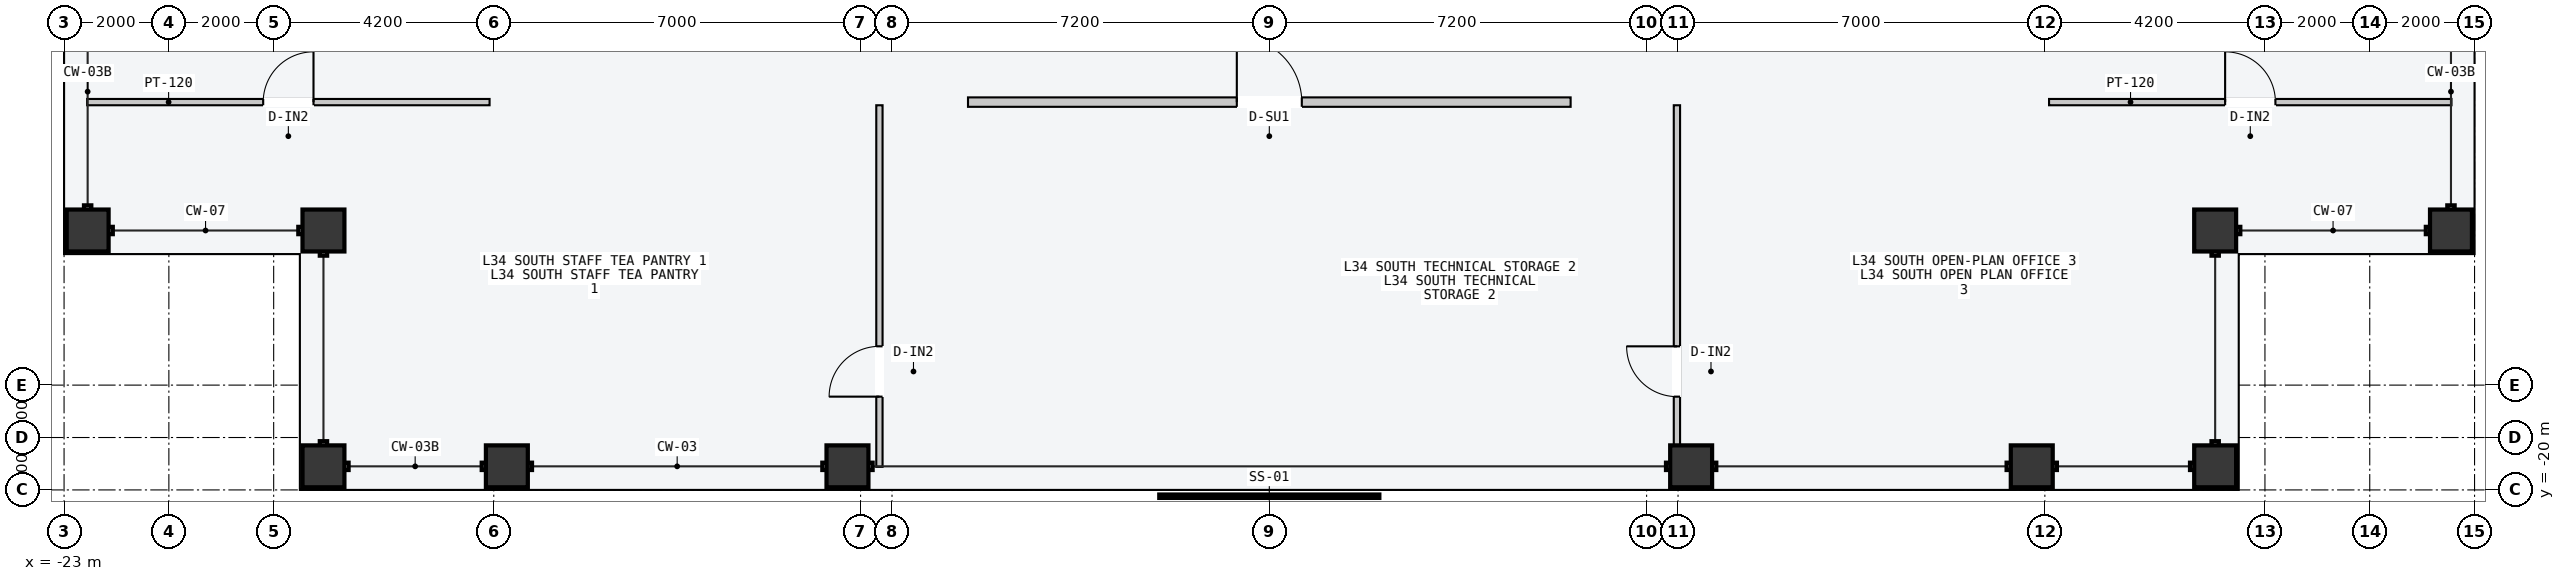
"""IFC4 building model, lengths in metres.
Left out: names, types, materials, properties, quantities, classifications, styles, units other than length and angle.
Written with IfcOpenShell. Run it as: python <this file> out.ifc"""

import sys

from ifc_helpers import new_model, si_unit, direction, frame, frame_2d, origin, origin_2d, place, context, subcontext, project, spatial, rectangle, hollow_rectangle, extrude, element, fill, save


model = new_model("IFC4")
c1 = context("Model", 3, precision=1e-05, world=origin(), true_north=direction((0.0, 1.0)))
c2 = subcontext(c1, "Body", "Model", "MODEL_VIEW")
j1 = project(units=[si_unit("LENGTHUNIT", "METRE"), si_unit("PLANEANGLEUNIT", "RADIAN")], contexts=[c1])
p1 = place(None, origin())
s1 = spatial("IfcSite", under=j1, at=p1, CompositionType="ELEMENT")
p2 = place(p1, origin())
s2 = spatial("IfcBuilding", under=s1, at=p2, CompositionType="ELEMENT")
p3 = place(p2, frame((0.0, 0.0, 131.4)))
s3 = spatial("IfcBuildingStorey", under=s2, at=p3, CompositionType="ELEMENT", Elevation=131.4)
for number, where, z_axis, x_axis in (
    (1, (-18.05, -19.55, 0.0), (0.0, 0.0, 1.0), (1.0, 0.0, 0.0)),
    (2, (-14.55, -19.55, 0.0), (0.0, 0.0, 1.0), (1.0, 0.0, 0.0)),
    (3, (-8.05, -19.55, 0.0), (0.0, 0.0, 1.0), (1.0, 0.0, 0.0)),
    (4, (8.05, -19.55, 0.0), (0.0, 0.0, 1.0), (1.0, 0.0, 0.0)),
    (5, (14.55, -19.55, 0.0), (0.0, 0.0, 1.0), (1.0, 0.0, 0.0)),
    (6, (18.05, -19.55, 0.0), (0.0, 0.0, 1.0), (1.0, 0.0, 0.0)),
    (7, (-22.55, -15.05, 0.0), (0.0, 0.0, 1.0), (0.0, 1.0, 0.0)),
    (8, (22.55, -15.05, 0.0), (0.0, 0.0, 1.0), (0.0, 1.0, 0.0)),
    (9, (18.05, -15.05, 0.0), (0.0, 0.0, 1.0), (1.0, 0.0, 0.0)),
    (10, (-18.05, -15.05, 0.0), (0.0, 0.0, 1.0), (1.0, 0.0, 0.0)),
):
    element("IfcColumn", number, at=place(p3, frame(where, z_axis=z_axis, x_axis=x_axis)), inside=s3, PredefinedType="COLUMN", context=c2, shape_type="SweptSolid", body=[
        extrude(hollow_rectangle(XDim=0.8, YDim=0.8, WallThickness=0.036, at=origin_2d()), origin(), (0.0, 0.0, 1.0), 3.6),
    ])
p4 = place(p3, frame((-7.44, -19.56, 0.0), z_axis=(0.0, 0.0, 1.0), x_axis=(0.0, 1.0, 0.0)))
e11 = element("IfcWall", 11, at=p4, inside=s3, PredefinedType="PARTITIONING", context=c2, shape_type="SweptSolid", body=[
    extrude(rectangle(XDim=6.9, YDim=0.12, at=frame_2d((3.45, 0.0))), origin(), (0.0, 0.0, 1.0), 3.4),
])
p5 = place(p4, frame((1.34, 0.0, 0.0)))
e12 = element("IfcOpeningElement", 12, at=p5, cuts=e11, PredefinedType="OPENING", context=c2, shape_type="SweptSolid", body=[
    extrude(rectangle(XDim=0.96, YDim=2.18, at=frame_2d((0.48, 1.09))), frame((0.0, 0.07, 0.0), z_axis=(0.0, -1.0, 0.0), x_axis=(1.0, 0.0, 0.0)), (0.0, 0.0, 1.0), 0.14),
])
p6 = place(p3, frame((7.779, -19.56, 0.0), z_axis=(0.0, 0.0, 1.0), x_axis=(0.0, 1.0, 0.0)))
e13 = element("IfcWall", 13, at=p6, inside=s3, PredefinedType="PARTITIONING", context=c2, shape_type="SweptSolid", body=[
    extrude(rectangle(XDim=6.9, YDim=0.12, at=frame_2d((3.45, 0.0))), origin(), (0.0, 0.0, 1.0), 3.4),
])
p7 = place(p6, frame((1.34, 0.0, 0.0)))
e14 = element("IfcOpeningElement", 14, at=p7, cuts=e13, PredefinedType="OPENING", context=c2, shape_type="SweptSolid", body=[
    extrude(rectangle(XDim=0.96, YDim=2.18, at=frame_2d((0.48, 1.09))), frame((0.0, 0.07, 0.0), z_axis=(0.0, -1.0, 0.0), x_axis=(1.0, 0.0, 0.0)), (0.0, 0.0, 1.0), 0.14),
])
p8 = place(p3, frame((-5.75, -12.6, 0.0), z_axis=(0.0, 0.0, 1.0), x_axis=(1.0, 0.0, 0.0)))
e15 = element("IfcWall", 15, at=p8, inside=s3, PredefinedType="PARTITIONING", context=c2, shape_type="SweptSolid", body=[
    extrude(rectangle(XDim=11.5, YDim=0.18, at=frame_2d((5.75, 0.0))), origin(), (0.0, 0.0, 1.0), 3.4),
])
p9 = place(p8, frame((5.13, 0.0, 0.0)))
e16 = element("IfcOpeningElement", 16, at=p9, cuts=e15, PredefinedType="OPENING", context=c2, shape_type="SweptSolid", body=[
    extrude(rectangle(XDim=1.24, YDim=2.24, at=frame_2d((0.62, 1.12))), frame((0.0, 0.1, 0.0), z_axis=(0.0, -1.0, 0.0), x_axis=(1.0, 0.0, 0.0)), (0.0, 0.0, 1.0), 0.2),
])
p10 = place(p3, frame((-22.56, -12.6, 0.0), z_axis=(0.0, 0.0, 1.0), x_axis=(1.0, 0.0, 0.0)))
e17 = element("IfcWall", 17, at=p10, inside=s3, PredefinedType="PARTITIONING", context=c2, shape_type="SweptSolid", body=[
    extrude(rectangle(XDim=7.68, YDim=0.12, at=frame_2d((3.84, 0.0))), origin(), (0.0, 0.0, 1.0), 3.4),
])
p11 = place(p10, frame((3.36, 0.0, 0.0)))
e18 = element("IfcOpeningElement", 18, at=p11, cuts=e17, PredefinedType="OPENING", context=c2, shape_type="SweptSolid", body=[
    extrude(rectangle(XDim=0.96, YDim=2.18, at=frame_2d((0.48, 1.09))), frame((0.0, 0.07, 0.0), z_axis=(0.0, -1.0, 0.0), x_axis=(1.0, 0.0, 0.0)), (0.0, 0.0, 1.0), 0.14),
])
p12 = place(p3, frame((14.88, -12.6, 0.0), z_axis=(0.0, 0.0, 1.0), x_axis=(1.0, 0.0, 0.0)))
e19 = element("IfcWall", 19, at=p12, inside=s3, PredefinedType="PARTITIONING", context=c2, shape_type="SweptSolid", body=[
    extrude(rectangle(XDim=7.68, YDim=0.12, at=frame_2d((3.84, 0.0))), origin(), (0.0, 0.0, 1.0), 3.4),
])
p13 = place(p12, frame((3.36, 0.0, 0.0)))
e20 = element("IfcOpeningElement", 20, at=p13, cuts=e19, PredefinedType="OPENING", context=c2, shape_type="SweptSolid", body=[
    extrude(rectangle(XDim=0.96, YDim=2.18, at=frame_2d((0.48, 1.09))), frame((0.0, 0.07, 0.0), z_axis=(0.0, -1.0, 0.0), x_axis=(1.0, 0.0, 0.0)), (0.0, 0.0, 1.0), 0.14),
])
p14 = place(p5, origin())
e21 = element("IfcDoor", 21, at=p14, inside=s3, OperationType="SINGLE_SWING_LEFT", PredefinedType="DOOR", context=c2, shape_type="SweptSolid", body=[
    extrude(rectangle(XDim=0.96, YDim=2.18, at=frame_2d((0.48, 1.09))), frame((0.0, 0.025, 0.0), z_axis=(0.0, -1.0, 0.0), x_axis=(1.0, 0.0, 0.0)), (0.0, 0.0, 1.0), 0.05),
])
fill(e12, e21)
p15 = place(p7, origin())
e22 = element("IfcDoor", 22, at=p15, inside=s3, OperationType="SINGLE_SWING_RIGHT", PredefinedType="DOOR", context=c2, shape_type="SweptSolid", body=[
    extrude(rectangle(XDim=0.96, YDim=2.18, at=frame_2d((0.48, 1.09))), frame((0.0, 0.025, 0.0), z_axis=(0.0, -1.0, 0.0), x_axis=(1.0, 0.0, 0.0)), (0.0, 0.0, 1.0), 0.05),
])
fill(e14, e22)
p16 = place(p9, origin())
e23 = element("IfcDoor", 23, at=p16, inside=s3, OperationType="SINGLE_SWING_LEFT", PredefinedType="DOOR", context=c2, shape_type="SweptSolid", body=[
    extrude(rectangle(XDim=1.24, YDim=2.24, at=frame_2d((0.62, 1.12))), frame((0.0, 0.025, 0.0), z_axis=(0.0, -1.0, 0.0), x_axis=(1.0, 0.0, 0.0)), (0.0, 0.0, 1.0), 0.05),
])
fill(e16, e23)
p17 = place(p11, origin())
e24 = element("IfcDoor", 24, at=p17, inside=s3, OperationType="SINGLE_SWING_RIGHT", PredefinedType="DOOR", context=c2, shape_type="SweptSolid", body=[
    extrude(rectangle(XDim=0.96, YDim=2.18, at=frame_2d((0.48, 1.09))), frame((0.0, 0.025, 0.0), z_axis=(0.0, -1.0, 0.0), x_axis=(1.0, 0.0, 0.0)), (0.0, 0.0, 1.0), 0.05),
])
fill(e18, e24)
p18 = place(p13, origin())
e25 = element("IfcDoor", 25, at=p18, inside=s3, OperationType="SINGLE_SWING_LEFT", PredefinedType="DOOR", context=c2, shape_type="SweptSolid", body=[
    extrude(rectangle(XDim=0.96, YDim=2.18, at=frame_2d((0.48, 1.09))), frame((0.0, 0.025, 0.0), z_axis=(0.0, -1.0, 0.0), x_axis=(1.0, 0.0, 0.0)), (0.0, 0.0, 1.0), 0.05),
])
fill(e20, e25)
save(model, sys.argv[1])
